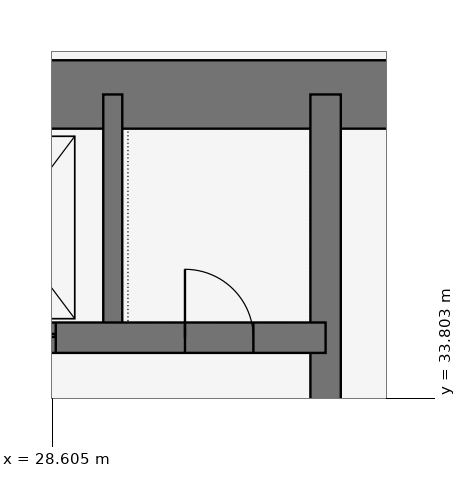
"""IFC4 building model, lengths in metres.
Left out: names, types, materials, properties, quantities, classifications, styles, units other than length and angle.
Written with IfcOpenShell. Run it as: python <this file> out.ifc"""

import sys

from ifc_helpers import new_model, si_unit, direction, frame, frame_2d, origin, place, context, subcontext, project, spatial, rectangle, extrude, element, fill, save


model = new_model("IFC4")
c1 = context("Model", 3, precision=1e-05, world=origin(), true_north=direction((0.0, 1.0)))
c2 = subcontext(c1, "Body", "Model", "MODEL_VIEW")
j1 = project(units=[si_unit("LENGTHUNIT", "METRE"), si_unit("PLANEANGLEUNIT", "RADIAN")], contexts=[c1])
p1 = place(None, origin())
s1 = spatial("IfcSite", under=j1, at=p1, CompositionType="ELEMENT")
p2 = place(p1, origin())
s2 = spatial("IfcBuilding", under=s1, at=p2, CompositionType="ELEMENT")
p3 = place(p2, frame((0.0, 0.0, 152.1)))
s3 = spatial("IfcBuildingStorey", under=s2, at=p3, CompositionType="ELEMENT", Elevation=152.1)
p4 = place(p3, frame((37.8, 37.8, 0.0), z_axis=(0.0, 0.0, 1.0), x_axis=(-1.0, 0.0, 0.0)))
e1 = element("IfcWall", 1, at=p4, inside=s3, PredefinedType="SHEAR", context=c2, shape_type="SweptSolid", body=[
    extrude(rectangle(XDim=17.25, YDim=0.9, at=frame_2d((8.625, 0.0))), origin(), (0.0, 0.0, 1.0), 3.6),
])
p5 = place(p3, frame((21.0, 34.6, 0.0), z_axis=(0.0, 0.0, 1.0), x_axis=(1.0, 0.0, 0.0)))
e2 = element("IfcWall", 2, at=p5, inside=s3, PredefinedType="SHEAR", context=c2, shape_type="SweptSolid", body=[
    extrude(rectangle(XDim=11.2, YDim=0.4, at=frame_2d((5.6, 0.0))), origin(), (0.0, 0.0, 1.0), 3.6),
])
p6 = place(p5, frame((9.35, 0.0, 0.0)))
e3 = element("IfcOpeningElement", 3, at=p6, cuts=e2, PredefinedType="OPENING", context=c2, shape_type="SweptSolid", body=[
    extrude(rectangle(XDim=0.9, YDim=2.1, at=frame_2d((0.45, 1.05))), frame((0.0, 0.21, 0.0), z_axis=(0.0, -1.0, 0.0), x_axis=(1.0, 0.0, 0.0)), (0.0, 0.0, 1.0), 0.42),
])
p7 = place(p5, frame((1.0, 0.0, 0.0)))
e4 = element("IfcOpeningElement", 4, at=p7, cuts=e2, PredefinedType="OPENING", context=c2, shape_type="SweptSolid", body=[
    extrude(rectangle(XDim=1.1, YDim=2.1, at=frame_2d((0.55, 1.05))), frame((0.0, 0.21, 0.0), z_axis=(0.0, -1.0, 0.0), x_axis=(1.0, 0.0, 0.0)), (0.0, 0.0, 1.0), 0.42),
])
p8 = place(p5, frame((3.65, 0.0, 0.0)))
e5 = element("IfcOpeningElement", 5, at=p8, cuts=e2, PredefinedType="OPENING", context=c2, shape_type="SweptSolid", body=[
    extrude(rectangle(XDim=1.1, YDim=2.1, at=frame_2d((0.55, 1.05))), frame((0.0, 0.21, 0.0), z_axis=(0.0, -1.0, 0.0), x_axis=(1.0, 0.0, 0.0)), (0.0, 0.0, 1.0), 0.42),
])
p9 = place(p5, frame((6.35, 0.0, 0.0)))
e6 = element("IfcOpeningElement", 6, at=p9, cuts=e2, PredefinedType="OPENING", context=c2, shape_type="SweptSolid", body=[
    extrude(rectangle(XDim=1.3, YDim=2.1, at=frame_2d((0.65, 1.05))), frame((0.0, 0.21, 0.0), z_axis=(0.0, -1.0, 0.0), x_axis=(1.0, 0.0, 0.0)), (0.0, 0.0, 1.0), 0.42),
])
p10 = place(p3, frame((32.2, 29.2, 0.0), z_axis=(0.0, 0.0, 1.0), x_axis=(0.0, 1.0, 0.0)))
e7 = element("IfcWall", 7, at=p10, inside=s3, PredefinedType="SHEAR", context=c2, shape_type="SweptSolid", body=[
    extrude(rectangle(XDim=8.6, YDim=0.4, at=frame_2d((4.3, 0.0))), origin(), (0.0, 0.0, 1.0), 3.6),
])
p11 = place(p3, frame((29.4, 34.6, 0.0), z_axis=(0.0, 0.0, 1.0), x_axis=(0.0, 1.0, 0.0)))
e8 = element("IfcWall", 8, at=p11, inside=s3, PredefinedType="SHEAR", context=c2, shape_type="SweptSolid", body=[
    extrude(rectangle(XDim=3.2, YDim=0.25, at=frame_2d((1.6, 0.0))), origin(), (0.0, 0.0, 1.0), 3.6),
])
p12 = place(p6, origin())
e9 = element("IfcDoor", 9, at=p12, inside=s3, OperationType="SINGLE_SWING_LEFT", PredefinedType="DOOR", context=c2, shape_type="SweptSolid", body=[
    extrude(rectangle(XDim=0.9, YDim=2.1, at=frame_2d((0.45, 1.05))), frame((0.0, 0.025, 0.0), z_axis=(0.0, -1.0, 0.0), x_axis=(1.0, 0.0, 0.0)), (0.0, 0.0, 1.0), 0.05),
])
fill(e3, e9)
p13 = place(p9, origin())
e10 = element("IfcDoor", 10, at=p13, inside=s3, OperationType="DOUBLE_DOOR_SLIDING", PredefinedType="DOOR", context=c2, shape_type="SweptSolid", body=[
    extrude(rectangle(XDim=1.3, YDim=2.1, at=frame_2d((0.65, 1.05))), frame((0.0, 0.025, 0.0), z_axis=(0.0, -1.0, 0.0), x_axis=(1.0, 0.0, 0.0)), (0.0, 0.0, 1.0), 0.05),
])
fill(e6, e10)
save(model, sys.argv[1])
